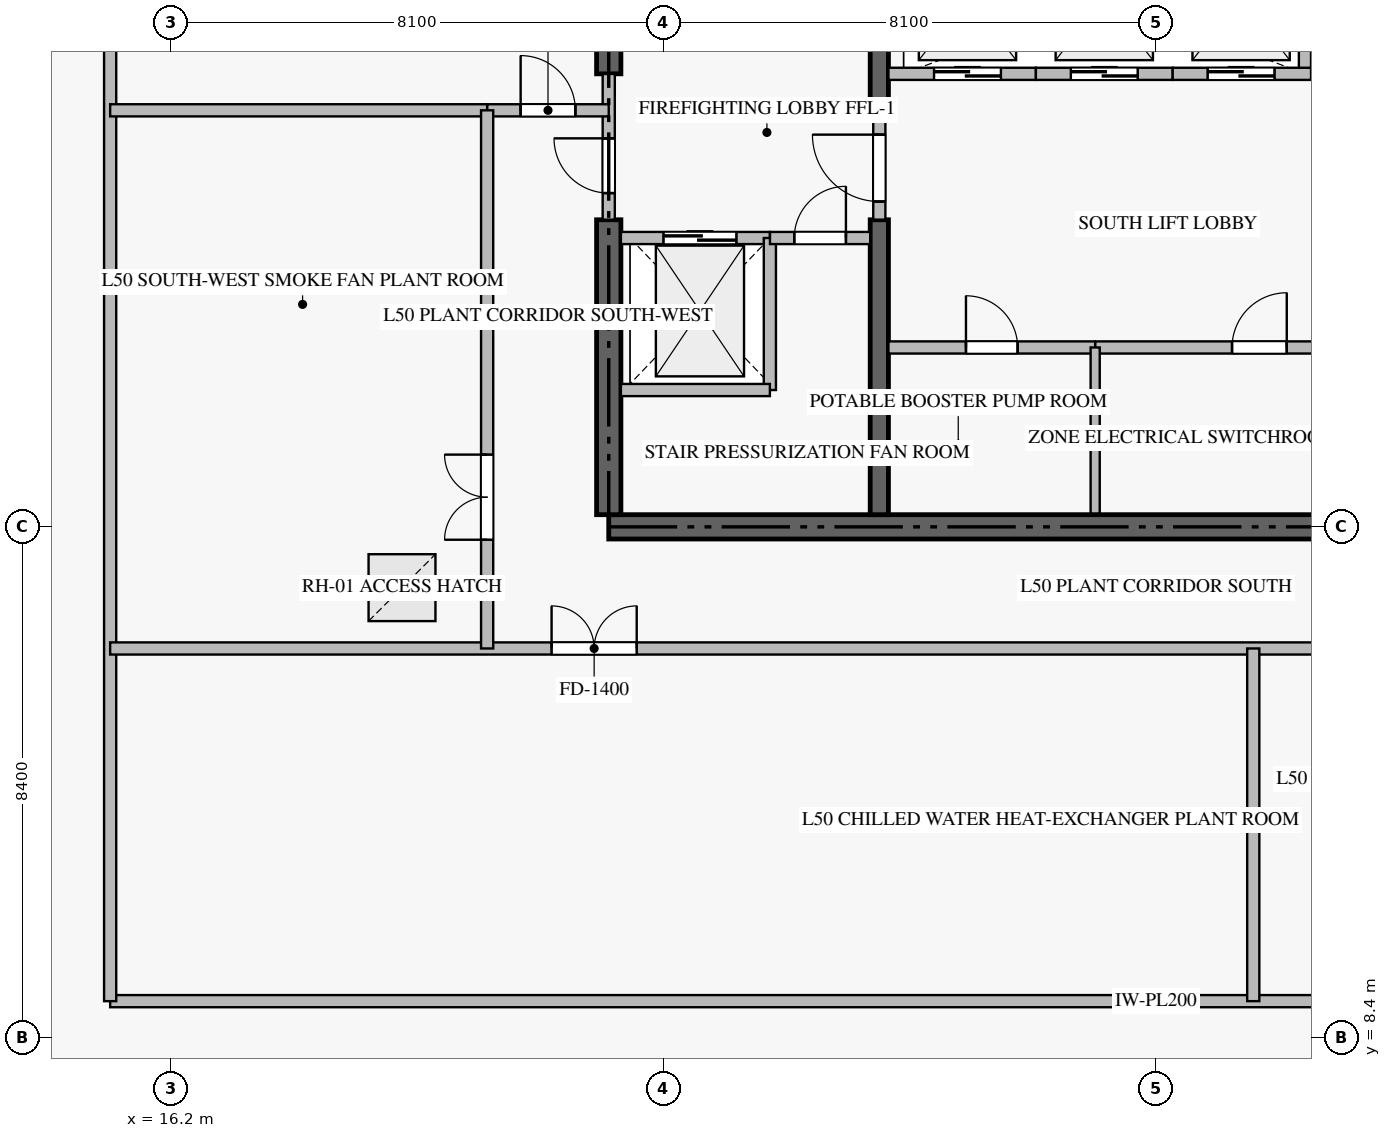
"""IFC4 building model, lengths in metres.
Left out: names, types, materials, properties, quantities, classifications, styles, units other than length and angle.
Written with IfcOpenShell. Run it as: python <this file> out.ifc"""

import sys

from ifc_helpers import new_model, si_unit, direction, frame, frame_2d, origin, origin_2d, place, context, subcontext, project, spatial, rectangle, extrude, source, transform, mapped, element, fill, save


model = new_model("IFC4")
c1 = context("Model", 3, precision=1e-05, world=origin(), true_north=direction((0.0, 1.0)))
c2 = subcontext(c1, "Body", "Model", "MODEL_VIEW")
j1 = project(units=[si_unit("LENGTHUNIT", "METRE"), si_unit("PLANEANGLEUNIT", "RADIAN")], contexts=[c1])
p1 = place(None, origin())
s1 = spatial("IfcSite", under=j1, at=p1, CompositionType="ELEMENT")
p2 = place(p1, origin())
s2 = spatial("IfcBuilding", under=s1, at=p2, CompositionType="ELEMENT")
p3 = place(p2, frame((0.0, 0.0, 198.9)))
s3 = spatial("IfcBuildingStorey", under=s2, at=p3, CompositionType="ELEMENT", Elevation=198.9)
p4 = place(p3, frame((23.4, 16.8, -0.44), z_axis=(0.0, 0.0, 1.0), x_axis=(1.0, 0.0, 0.0)))
e1 = element("IfcWall", 1, at=p4, inside=s3, PredefinedType="SHEAR", context=c2, shape_type="SweptSolid", body=[
    extrude(rectangle(XDim=18.0, YDim=0.4, at=frame_2d((9.0, 0.0))), origin(), (0.0, 0.0, 1.0), 6.078),
])
p5 = place(p3, frame((23.4, 17.0, -0.44), z_axis=(0.0, 0.0, 1.0), x_axis=(0.0, 1.0, 0.0)))
e2 = element("IfcWall", 2, at=p5, inside=s3, PredefinedType="SHEAR", context=c2, shape_type="SweptSolid", body=[
    extrude(rectangle(XDim=4.85, YDim=0.4, at=frame_2d((2.425, 0.0))), origin(), (0.0, 0.0, 1.0), 6.078),
])
p6 = place(p3, frame((23.4, 24.25, -0.44), z_axis=(0.0, 0.0, 1.0), x_axis=(0.0, 1.0, 0.0)))
e3 = element("IfcWall", 3, at=p6, inside=s3, PredefinedType="SHEAR", context=c2, shape_type="SweptSolid", body=[
    extrude(rectangle(XDim=9.15, YDim=0.4, at=frame_2d((4.575, 0.0))), origin(), (0.0, 0.0, 1.0), 6.078),
])
p7 = place(p3, frame((27.85, 17.0, -0.44), z_axis=(0.0, 0.0, 1.0), x_axis=(0.0, 1.0, 0.0)))
e4 = element("IfcWall", 4, at=p7, inside=s3, PredefinedType="SHEAR", context=c2, shape_type="SweptSolid", body=[
    extrude(rectangle(XDim=4.85, YDim=0.3, at=frame_2d((2.425, 0.0))), origin(), (0.0, 0.0, 1.0), 6.078),
])
p8 = place(p3, frame((27.85, 23.55, -0.44), z_axis=(0.0, 0.0, 1.0), x_axis=(0.0, 1.0, 0.0)))
e5 = element("IfcWall", 5, at=p8, inside=s3, PredefinedType="SHEAR", context=c2, shape_type="SweptSolid", body=[
    extrude(rectangle(XDim=9.85, YDim=0.3, at=frame_2d((4.925, 0.0))), origin(), (0.0, 0.0, 1.0), 6.078),
])
p9 = place(p3, frame((23.6, 21.55, 0.0), z_axis=(0.0, 0.0, 1.0), x_axis=(1.0, 0.0, 0.0)))
e6 = element("IfcWall", 6, at=p9, inside=s3, PredefinedType="STANDARD", context=c2, shape_type="SweptSolid", body=[
    extrude(rectangle(XDim=2.45, YDim=0.2, at=frame_2d((1.225, 0.0))), origin(), (0.0, 0.0, 1.0), 5.64),
])
p10 = place(p9, frame((0.7, 0.0, 0.0)))
e7 = element("IfcOpeningElement", 7, at=p10, cuts=e6, PredefinedType="OPENING", context=c2, shape_type="SweptSolid", body=[
    extrude(rectangle(XDim=1.2, YDim=2.2, at=frame_2d((0.6, 1.1))), frame((0.0, 0.11, 0.0), z_axis=(0.0, -1.0, 0.0), x_axis=(1.0, 0.0, 0.0)), (0.0, 0.0, 1.0), 0.22),
])
p11 = place(p3, frame((28.0, 24.25, 0.0), z_axis=(0.0, 0.0, 1.0), x_axis=(1.0, 0.0, 0.0)))
e8 = element("IfcWall", 8, at=p11, inside=s3, PredefinedType="STANDARD", context=c2, shape_type="SweptSolid", body=[
    extrude(rectangle(XDim=2.425, YDim=0.2, at=frame_2d((1.212, 0.0))), origin(), (0.0, 0.0, 1.0), 5.64),
])
p12 = place(p11, frame((0.75, 0.0, 0.0)))
e9 = element("IfcOpeningElement", 9, at=p12, cuts=e8, PredefinedType="OPENING", context=c2, shape_type="SweptSolid", body=[
    extrude(rectangle(XDim=1.1, YDim=2.2, at=frame_2d((0.55, 1.1))), frame((0.0, 0.11, 0.0), z_axis=(0.0, -1.0, 0.0), x_axis=(1.0, 0.0, 0.0)), (0.0, 0.0, 1.0), 0.22),
])
p13 = place(p3, frame((30.425, 24.25, 0.0), z_axis=(0.0, 0.0, 1.0), x_axis=(1.0, 0.0, 0.0)))
e10 = element("IfcWall", 10, at=p13, inside=s3, PredefinedType="STANDARD", context=c2, shape_type="SweptSolid", body=[
    extrude(rectangle(XDim=2.25, YDim=0.2, at=frame_2d((1.125, 0.0))), origin(), (0.0, 0.0, 1.0), 5.64),
])
p14 = place(p13, frame((0.575, 0.0, 0.0)))
e11 = element("IfcOpeningElement", 11, at=p14, cuts=e10, PredefinedType="OPENING", context=c2, shape_type="SweptSolid", body=[
    extrude(rectangle(XDim=1.1, YDim=2.2, at=frame_2d((0.55, 1.1))), frame((0.0, 0.11, 0.0), z_axis=(0.0, -1.0, 0.0), x_axis=(1.0, 0.0, 0.0)), (0.0, 0.0, 1.0), 0.22),
])
p15 = place(p3, frame((32.675, 24.25, 0.0), z_axis=(0.0, 0.0, 1.0), x_axis=(1.0, 0.0, 0.0)))
e12 = element("IfcWall", 12, at=p15, inside=s3, PredefinedType="STANDARD", context=c2, shape_type="SweptSolid", body=[
    extrude(rectangle(XDim=2.275, YDim=0.2, at=frame_2d((1.137, 0.0))), origin(), (0.0, 0.0, 1.0), 5.64),
])
p16 = place(p15, frame((0.575, 0.0, 0.0)))
e13 = element("IfcOpeningElement", 13, at=p16, cuts=e12, PredefinedType="OPENING", context=c2, shape_type="SweptSolid", body=[
    extrude(rectangle(XDim=1.1, YDim=2.2, at=frame_2d((0.55, 1.1))), frame((0.0, 0.11, 0.0), z_axis=(0.0, -1.0, 0.0), x_axis=(1.0, 0.0, 0.0)), (0.0, 0.0, 1.0), 0.22),
])
for number, where, z_axis, x_axis in (
    (14, (34.85, 24.35, 0.0), (0.0, 0.0, 1.0), (0.0, 1.0, 0.0)),
    (15, (26.05, 19.05, 0.0), (0.0, 0.0, 1.0), (0.0, 1.0, 0.0)),
):
    element("IfcWall", number, at=place(p3, frame(where, z_axis=z_axis, x_axis=x_axis)), inside=s3, PredefinedType="STANDARD", context=c2, shape_type="SweptSolid", body=[
        extrude(rectangle(XDim=2.5, YDim=0.2, at=frame_2d((1.25, 0.0))), origin(), (0.0, 0.0, 1.0), 5.64),
    ])
p17 = place(p3, frame((23.6, 19.05, 0.0), z_axis=(0.0, 0.0, 1.0), x_axis=(1.0, 0.0, 0.0)))
e16 = element("IfcWall", 16, at=p17, inside=s3, PredefinedType="STANDARD", context=c2, shape_type="SweptSolid", body=[
    extrude(rectangle(XDim=2.45, YDim=0.2, at=frame_2d((1.225, 0.0))), origin(), (0.0, 0.0, 1.0), 5.64),
])
p18 = place(p3, frame((26.052, 21.55, 0.0), z_axis=(0.0, 0.0, 1.0), x_axis=(1.0, 0.0, 0.0)))
e17 = element("IfcWall", 17, at=p18, inside=s3, PredefinedType="STANDARD", context=c2, shape_type="SweptSolid", body=[
    extrude(rectangle(XDim=1.648, YDim=0.2, at=frame_2d((0.824, 0.0))), origin(), (0.0, 0.0, 1.0), 5.64),
])
p19 = place(p18, frame((0.399, 0.0, 0.0)))
e18 = element("IfcOpeningElement", 18, at=p19, cuts=e17, PredefinedType="OPENING", context=c2, shape_type="SweptSolid", body=[
    extrude(rectangle(XDim=0.85, YDim=2.1, at=frame_2d((0.425, 1.05))), frame((0.0, 0.11, 0.0), z_axis=(0.0, -1.0, 0.0), x_axis=(1.0, 0.0, 0.0)), (0.0, 0.0, 1.0), 0.22),
])
p20 = place(p3, frame((23.4, 21.852, 0.0), z_axis=(0.0, 0.0, 1.0), x_axis=(0.0, 1.0, 0.0)))
e19 = element("IfcWall", 19, at=p20, inside=s3, PredefinedType="STANDARD", context=c2, shape_type="SweptSolid", body=[
    extrude(rectangle(XDim=2.396, YDim=0.2, at=frame_2d((1.198, 0.0))), origin(), (0.0, 0.0, 1.0), 5.64),
])
p21 = place(p20, frame((0.437, 0.0, 0.0)))
e20 = element("IfcOpeningElement", 20, at=p21, cuts=e19, PredefinedType="OPENING", context=c2, shape_type="SweptSolid", body=[
    extrude(rectangle(XDim=0.9, YDim=2.1, at=frame_2d((0.45, 1.05))), frame((0.0, 0.11, 0.0), z_axis=(0.0, -1.0, 0.0), x_axis=(1.0, 0.0, 0.0)), (0.0, 0.0, 1.0), 0.22),
])
p22 = place(p3, frame((27.85, 21.852, 0.0), z_axis=(0.0, 0.0, 1.0), x_axis=(0.0, 1.0, 0.0)))
e21 = element("IfcWall", 21, at=p22, inside=s3, PredefinedType="STANDARD", context=c2, shape_type="SweptSolid", body=[
    extrude(rectangle(XDim=1.696, YDim=0.2, at=frame_2d((0.848, 0.0))), origin(), (0.0, 0.0, 1.0), 5.64),
])
p23 = place(p22, frame((0.298, 0.0, 0.0)))
e22 = element("IfcOpeningElement", 22, at=p23, cuts=e21, PredefinedType="OPENING", context=c2, shape_type="SweptSolid", body=[
    extrude(rectangle(XDim=1.1, YDim=2.15, at=frame_2d((0.55, 1.075))), frame((0.0, 0.11, 0.0), z_axis=(0.0, -1.0, 0.0), x_axis=(1.0, 0.0, 0.0)), (0.0, 0.0, 1.0), 0.22),
])
p24 = place(p3, frame((28.0, 19.75, 0.0), z_axis=(0.0, 0.0, 1.0), x_axis=(1.0, 0.0, 0.0)))
e23 = element("IfcWall", 23, at=p24, inside=s3, PredefinedType="STANDARD", context=c2, shape_type="SweptSolid", body=[
    extrude(rectangle(XDim=3.4, YDim=0.2, at=frame_2d((1.7, 0.0))), origin(), (0.0, 0.0, 1.0), 5.64),
])
p25 = place(p24, frame((1.275, 0.0, 0.0)))
e24 = element("IfcOpeningElement", 24, at=p25, cuts=e23, PredefinedType="OPENING", context=c2, shape_type="SweptSolid", body=[
    extrude(rectangle(XDim=0.85, YDim=2.1, at=frame_2d((0.425, 1.05))), frame((0.0, 0.11, 0.0), z_axis=(0.0, -1.0, 0.0), x_axis=(1.0, 0.0, 0.0)), (0.0, 0.0, 1.0), 0.22),
])
p26 = place(p3, frame((31.402, 19.75, 0.0), z_axis=(0.0, 0.0, 1.0), x_axis=(1.0, 0.0, 0.0)))
e25 = element("IfcWall", 25, at=p26, inside=s3, PredefinedType="STANDARD", context=c2, shape_type="SweptSolid", body=[
    extrude(rectangle(XDim=5.398, YDim=0.2, at=frame_2d((2.699, 0.0))), origin(), (0.0, 0.0, 1.0), 5.64),
])
p27 = place(p26, frame((2.249, 0.0, 0.0)))
e26 = element("IfcOpeningElement", 26, at=p27, cuts=e25, PredefinedType="OPENING", context=c2, shape_type="SweptSolid", body=[
    extrude(rectangle(XDim=0.9, YDim=2.1, at=frame_2d((0.45, 1.05))), frame((0.0, 0.11, 0.0), z_axis=(0.0, -1.0, 0.0), x_axis=(1.0, 0.0, 0.0)), (0.0, 0.0, 1.0), 0.22),
])
p28 = place(p3, frame((31.4, 17.02, 0.0), z_axis=(0.0, 0.0, 1.0), x_axis=(0.0, 1.0, 0.0)))
e27 = element("IfcWall", 27, at=p28, inside=s3, PredefinedType="PARTITIONING", context=c2, shape_type="SweptSolid", body=[
    extrude(rectangle(XDim=2.73, YDim=0.15, at=frame_2d((1.365, 0.0))), origin(), (0.0, 0.0, 1.0), 5.64),
])
p29 = place(p3, frame((15.2, 9.0, 0.0), z_axis=(0.0, 0.0, 1.0), x_axis=(1.0, 0.0, 0.0)))
e28 = element("IfcWall", 28, at=p29, inside=s3, PredefinedType="STANDARD", context=c2, shape_type="SweptSolid", body=[
    extrude(rectangle(XDim=34.4, YDim=0.2, at=frame_2d((17.2, 0.0))), origin(), (0.0, 0.0, 1.0), 5.64),
])
p30 = place(p3, frame((15.2, 9.0, 0.0), z_axis=(0.0, 0.0, 1.0), x_axis=(0.0, 1.0, 0.0)))
e29 = element("IfcWall", 29, at=p30, inside=s3, PredefinedType="STANDARD", context=c2, shape_type="SweptSolid", body=[
    extrude(rectangle(XDim=32.4, YDim=0.2, at=frame_2d((16.2, 0.0))), origin(), (0.0, 0.0, 1.0), 5.64),
])
p31 = place(p3, frame((15.2, 23.65, 0.0), z_axis=(0.0, 0.0, 1.0), x_axis=(1.0, 0.0, 0.0)))
e30 = element("IfcWall", 30, at=p31, inside=s3, PredefinedType="STANDARD", context=c2, shape_type="SweptSolid", body=[
    extrude(rectangle(XDim=6.2, YDim=0.2, at=frame_2d((3.1, 0.0))), origin(), (0.0, 0.0, 1.0), 5.64),
])
p32 = place(p3, frame((21.402, 23.65, 0.0), z_axis=(0.0, 0.0, 1.0), x_axis=(1.0, 0.0, 0.0)))
e31 = element("IfcWall", 31, at=p32, inside=s3, PredefinedType="STANDARD", context=c2, shape_type="SweptSolid", body=[
    extrude(rectangle(XDim=1.998, YDim=0.2, at=frame_2d((0.999, 0.0))), origin(), (0.0, 0.0, 1.0), 5.64),
])
p33 = place(p32, frame((0.549, 0.0, 0.0)))
e32 = element("IfcOpeningElement", 32, at=p33, cuts=e31, PredefinedType="OPENING", context=c2, shape_type="SweptSolid", body=[
    extrude(rectangle(XDim=0.9, YDim=2.1, at=frame_2d((0.45, 1.05))), frame((0.0, 0.11, 0.0), z_axis=(0.0, -1.0, 0.0), x_axis=(1.0, 0.0, 0.0)), (0.0, 0.0, 1.0), 0.22),
])
p34 = place(p3, frame((15.2, 14.8, 0.0), z_axis=(0.0, 0.0, 1.0), x_axis=(1.0, 0.0, 0.0)))
e33 = element("IfcWall", 33, at=p34, inside=s3, PredefinedType="STANDARD", context=c2, shape_type="SweptSolid", body=[
    extrude(rectangle(XDim=34.4, YDim=0.2, at=frame_2d((17.2, 0.0))), origin(), (0.0, 0.0, 1.0), 5.64),
])
p35 = place(p34, frame((7.26, 0.0, 0.0)))
e34 = element("IfcOpeningElement", 34, at=p35, cuts=e33, PredefinedType="OPENING", context=c2, shape_type="SweptSolid", body=[
    extrude(rectangle(XDim=1.4, YDim=2.2, at=frame_2d((0.7, 1.1))), frame((0.0, 0.11, 0.0), z_axis=(0.0, -1.0, 0.0), x_axis=(1.0, 0.0, 0.0)), (0.0, 0.0, 1.0), 0.22),
])
p36 = place(p34, frame((25.74, 0.0, 0.0)))
e35 = element("IfcOpeningElement", 35, at=p36, cuts=e33, PredefinedType="OPENING", context=c2, shape_type="SweptSolid", body=[
    extrude(rectangle(XDim=1.4, YDim=2.2, at=frame_2d((0.7, 1.1))), frame((0.0, 0.11, 0.0), z_axis=(0.0, -1.0, 0.0), x_axis=(1.0, 0.0, 0.0)), (0.0, 0.0, 1.0), 0.22),
])
p37 = place(p3, frame((34.0, 9.0, 0.0), z_axis=(0.0, 0.0, 1.0), x_axis=(0.0, 1.0, 0.0)))
e36 = element("IfcWall", 36, at=p37, inside=s3, PredefinedType="STANDARD", context=c2, shape_type="SweptSolid", body=[
    extrude(rectangle(XDim=5.8, YDim=0.2, at=frame_2d((2.9, 0.0))), origin(), (0.0, 0.0, 1.0), 5.64),
])
p38 = place(p3, frame((21.4, 14.8, 0.0), z_axis=(0.0, 0.0, 1.0), x_axis=(0.0, 1.0, 0.0)))
e37 = element("IfcWall", 37, at=p38, inside=s3, PredefinedType="STANDARD", context=c2, shape_type="SweptSolid", body=[
    extrude(rectangle(XDim=8.85, YDim=0.2, at=frame_2d((4.425, 0.0))), origin(), (0.0, 0.0, 1.0), 5.64),
])
p39 = place(p38, frame((1.788, 0.0, 0.0)))
e38 = element("IfcOpeningElement", 38, at=p39, cuts=e37, PredefinedType="OPENING", context=c2, shape_type="SweptSolid", body=[
    extrude(rectangle(XDim=1.4, YDim=2.2, at=frame_2d((0.7, 1.1))), frame((0.0, 0.11, 0.0), z_axis=(0.0, -1.0, 0.0), x_axis=(1.0, 0.0, 0.0)), (0.0, 0.0, 1.0), 0.22),
])
p40 = place(p2, frame((0.0, 0.0, 204.9)))
p41 = place(p40, frame((0.0, 0.0, -0.36)))
p42 = place(p41, frame((20.0, 15.8, 0.0)))
p43 = place(p42, frame((0.0, 0.0, 0.32)))
e39 = element("IfcDoor", 39, at=p43, inside=s3, OperationType="SINGLE_SWING_LEFT", PredefinedType="TRAPDOOR", context=c2, shape_type="SweptSolid", body=[
    extrude(rectangle(XDim=1.1, YDim=1.1, at=origin_2d()), origin(), (0.0, 0.0, 1.0), 0.04),
])
m1 = source(origin(), c2, "Body", "SweptSolid", [
    extrude(rectangle(XDim=1.2, YDim=2.2, at=frame_2d((0.6, 1.1))), frame((0.0, 0.025, 0.0), z_axis=(0.0, -1.0, 0.0), x_axis=(1.0, 0.0, 0.0)), (0.0, 0.0, 1.0), 0.05),
])
p44 = place(p10, origin())
e40 = element("IfcDoor", 40, at=p44, inside=s3, OperationType="DOUBLE_DOOR_SLIDING", PredefinedType="DOOR", context=c2, shape_type="MappedRepresentation", body=[
    mapped(m1, transform((0.0, 0.0, 0.0), scale=1.0)),
])
fill(e7, e40)
m2 = source(origin(), c2, "Body", "SweptSolid", [
    extrude(rectangle(XDim=1.1, YDim=2.2, at=frame_2d((0.55, 1.1))), frame((0.0, 0.025, 0.0), z_axis=(0.0, -1.0, 0.0), x_axis=(1.0, 0.0, 0.0)), (0.0, 0.0, 1.0), 0.05),
])
p45 = place(p12, origin())
e41 = element("IfcDoor", 41, at=p45, inside=s3, OperationType="DOUBLE_DOOR_SLIDING", PredefinedType="DOOR", context=c2, shape_type="MappedRepresentation", body=[
    mapped(m2, transform((0.0, 0.0, 0.0), scale=1.0)),
])
fill(e9, e41)
p46 = place(p14, origin())
e42 = element("IfcDoor", 42, at=p46, inside=s3, OperationType="DOUBLE_DOOR_SLIDING", PredefinedType="DOOR", context=c2, shape_type="MappedRepresentation", body=[
    mapped(m2, transform((0.0, 0.0, 0.0), scale=1.0)),
])
fill(e11, e42)
p47 = place(p16, origin())
e43 = element("IfcDoor", 43, at=p47, inside=s3, OperationType="DOUBLE_DOOR_SLIDING", PredefinedType="DOOR", context=c2, shape_type="MappedRepresentation", body=[
    mapped(m2, transform((0.0, 0.0, 0.0), scale=1.0)),
])
fill(e13, e43)
m3 = source(origin(), c2, "Body", "SweptSolid", [
    extrude(rectangle(XDim=0.85, YDim=2.1, at=frame_2d((0.425, 1.05))), frame((0.0, 0.025, 0.0), z_axis=(0.0, -1.0, 0.0), x_axis=(1.0, 0.0, 0.0)), (0.0, 0.0, 1.0), 0.05),
])
p48 = place(p19, origin())
e44 = element("IfcDoor", 44, at=p48, inside=s3, OperationType="SINGLE_SWING_RIGHT", PredefinedType="DOOR", context=c2, shape_type="MappedRepresentation", body=[
    mapped(m3, transform((0.0, 0.0, 0.0), scale=1.0)),
])
fill(e18, e44)
m4 = source(origin(), c2, "Body", "SweptSolid", [
    extrude(rectangle(XDim=0.9, YDim=2.1, at=frame_2d((0.45, 1.05))), frame((0.0, 0.025, 0.0), z_axis=(0.0, -1.0, 0.0), x_axis=(1.0, 0.0, 0.0)), (0.0, 0.0, 1.0), 0.05),
])
p49 = place(p21, origin())
e45 = element("IfcDoor", 45, at=p49, inside=s3, OperationType="SINGLE_SWING_RIGHT", PredefinedType="DOOR", context=c2, shape_type="MappedRepresentation", body=[
    mapped(m4, transform((0.0, 0.0, 0.0), scale=1.0)),
])
fill(e20, e45)
m5 = source(origin(), c2, "Body", "SweptSolid", [
    extrude(rectangle(XDim=1.1, YDim=2.15, at=frame_2d((0.55, 1.075))), frame((0.0, 0.025, 0.0), z_axis=(0.0, -1.0, 0.0), x_axis=(1.0, 0.0, 0.0)), (0.0, 0.0, 1.0), 0.05),
])
p50 = place(p23, origin())
e46 = element("IfcDoor", 46, at=p50, inside=s3, OperationType="SINGLE_SWING_RIGHT", PredefinedType="DOOR", context=c2, shape_type="MappedRepresentation", body=[
    mapped(m5, transform((0.0, 0.0, 0.0), scale=1.0)),
])
fill(e22, e46)
p51 = place(p25, origin())
e47 = element("IfcDoor", 47, at=p51, inside=s3, OperationType="SINGLE_SWING_LEFT", PredefinedType="DOOR", context=c2, shape_type="MappedRepresentation", body=[
    mapped(m3, transform((0.0, 0.0, 0.0), scale=1.0)),
])
fill(e24, e47)
p52 = place(p27, origin())
e48 = element("IfcDoor", 48, at=p52, inside=s3, OperationType="SINGLE_SWING_RIGHT", PredefinedType="DOOR", context=c2, shape_type="MappedRepresentation", body=[
    mapped(m4, transform((0.0, 0.0, 0.0), scale=1.0)),
])
fill(e26, e48)
p53 = place(p33, origin())
e49 = element("IfcDoor", 49, at=p53, inside=s3, OperationType="SINGLE_SWING_LEFT", PredefinedType="DOOR", context=c2, shape_type="MappedRepresentation", body=[
    mapped(m4, transform((0.0, 0.0, 0.0), scale=1.0)),
])
fill(e32, e49)
m6 = source(origin(), c2, "Body", "SweptSolid", [
    extrude(rectangle(XDim=1.4, YDim=2.2, at=frame_2d((0.7, 1.1))), frame((0.0, 0.025, 0.0), z_axis=(0.0, -1.0, 0.0), x_axis=(1.0, 0.0, 0.0)), (0.0, 0.0, 1.0), 0.05),
])
p54 = place(p35, origin())
e50 = element("IfcDoor", 50, at=p54, inside=s3, OperationType="DOUBLE_DOOR_SINGLE_SWING", PredefinedType="DOOR", context=c2, shape_type="MappedRepresentation", body=[
    mapped(m6, transform((0.0, 0.0, 0.0), scale=1.0)),
])
fill(e34, e50)
p55 = place(p39, origin())
e51 = element("IfcDoor", 51, at=p55, inside=s3, OperationType="DOUBLE_DOOR_SINGLE_SWING", PredefinedType="DOOR", context=c2, shape_type="MappedRepresentation", body=[
    mapped(m6, transform((0.0, 0.0, 0.0), scale=1.0)),
])
fill(e38, e51)
save(model, sys.argv[1])
